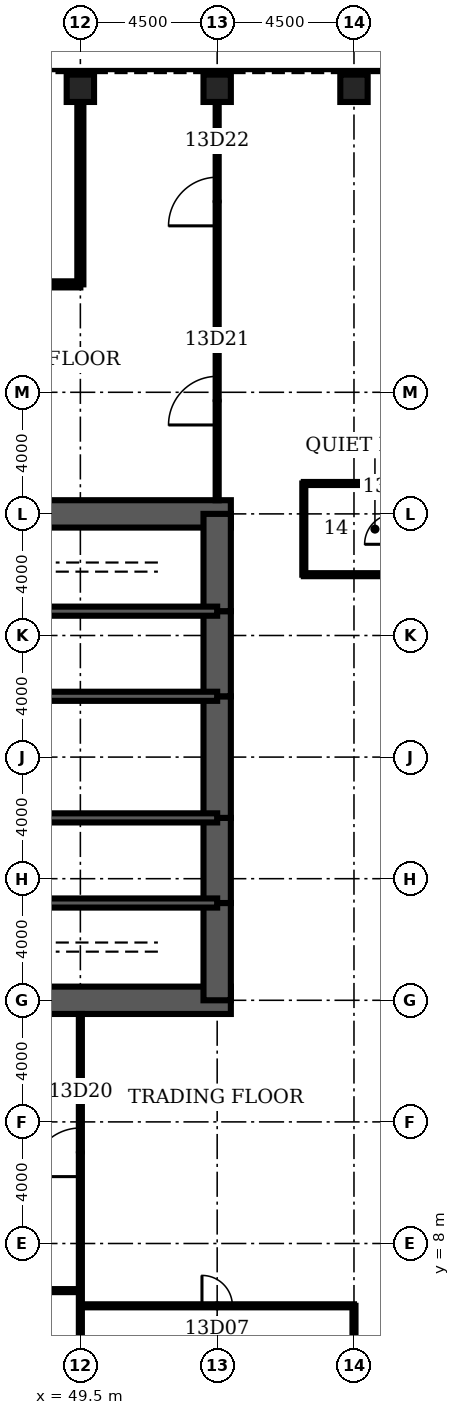
"""IFC4 building model, lengths in metres.
Left out: names, types, materials, properties, quantities, classifications, styles, units other than length and angle.
Written with IfcOpenShell. Run it as: python <this file> out.ifc"""

import sys

from ifc_helpers import new_model, si_unit, direction, frame, frame_2d, origin, origin_2d, place, context, subcontext, project, spatial, rectangle, hollow_rectangle, extrude, element, fill, save


model = new_model("IFC4")
c1 = context("Model", 3, precision=1e-05, world=origin(), true_north=direction((0.0, 1.0)))
c2 = subcontext(c1, "Body", "Model", "MODEL_VIEW")
j1 = project(units=[si_unit("LENGTHUNIT", "METRE"), si_unit("PLANEANGLEUNIT", "RADIAN")], contexts=[c1])
p1 = place(None, origin())
s1 = spatial("IfcSite", under=j1, at=p1, CompositionType="ELEMENT")
p2 = place(p1, origin())
s2 = spatial("IfcBuilding", under=s1, at=p2, CompositionType="ELEMENT")
p3 = place(p2, frame((0.0, 0.0, 63.5)))
s3 = spatial("IfcBuildingStorey", under=s2, at=p3, CompositionType="ELEMENT", Elevation=63.5)
for number, where, z_axis, x_axis in (
    (1, (58.5, 46.0, 0.0), (0.0, 0.0, 1.0), (0.0, 1.0, 0.0)),
    (2, (54.0, 46.0, 0.0), (0.0, 0.0, 1.0), (0.0, 1.0, 0.0)),
    (3, (49.5, 46.0, 0.0), (0.0, 0.0, 1.0), (0.0, 1.0, 0.0)),
):
    element("IfcColumn", number, at=place(p3, frame(where, z_axis=z_axis, x_axis=x_axis)), inside=s3, PredefinedType="COLUMN", context=c2, shape_type="SweptSolid", body=[
        extrude(hollow_rectangle(XDim=0.9, YDim=0.9, WallThickness=0.12, at=origin_2d()), origin(), (0.0, 0.0, 1.0), 4.5),
    ])
for number, where, z_axis, x_axis in (
    (4, (45.0, 16.0, 0.0), (0.0, 0.0, 1.0), (1.0, 0.0, 0.0)),
    (5, (54.45, 32.0, 0.0), (0.0, 0.0, 1.0), (-1.0, 0.0, 0.0)),
):
    element("IfcWall", number, at=place(p3, frame(where, z_axis=z_axis, x_axis=x_axis)), inside=s3, PredefinedType="SHEAR", context=c2, shape_type="SweptSolid", body=[
        extrude(rectangle(XDim=9.45, YDim=0.9, at=frame_2d((4.725, 0.0))), origin(), (0.0, 0.0, 1.0), 4.5),
    ])
p4 = place(p3, frame((54.0, 16.0, 0.0), z_axis=(0.0, 0.0, 1.0), x_axis=(0.0, 1.0, 0.0)))
e6 = element("IfcWall", 6, at=p4, inside=s3, PredefinedType="SHEAR", context=c2, shape_type="SweptSolid", body=[
    extrude(rectangle(XDim=3.2, YDim=0.9, at=frame_2d((1.6, 0.0))), origin(), (0.0, 0.0, 1.0), 4.5),
])
p5 = place(p3, frame((54.0, 19.2, 0.0), z_axis=(0.0, 0.0, 1.0), x_axis=(0.0, 1.0, 0.0)))
e7 = element("IfcWall", 7, at=p5, inside=s3, PredefinedType="SHEAR", context=c2, shape_type="SweptSolid", body=[
    extrude(rectangle(XDim=2.8, YDim=0.9, at=frame_2d((1.4, 0.0))), origin(), (0.0, 0.0, 1.0), 4.5),
])
p6 = place(p5, frame((0.4, 0.0, 0.0)))
e8 = element("IfcOpeningElement", 8, at=p6, cuts=e7, PredefinedType="OPENING", context=c2, shape_type="SweptSolid", body=[
    extrude(rectangle(XDim=1.8, YDim=2.1, at=frame_2d((0.9, 1.05))), frame((0.0, 0.46, 0.0), z_axis=(0.0, -1.0, 0.0), x_axis=(1.0, 0.0, 0.0)), (0.0, 0.0, 1.0), 0.92),
])
p7 = place(p3, frame((54.0, 22.0, 0.0), z_axis=(0.0, 0.0, 1.0), x_axis=(0.0, 1.0, 0.0)))
e9 = element("IfcWall", 9, at=p7, inside=s3, PredefinedType="SHEAR", context=c2, shape_type="SweptSolid", body=[
    extrude(rectangle(XDim=4.0, YDim=0.9, at=frame_2d((2.0, 0.0))), origin(), (0.0, 0.0, 1.0), 4.5),
])
p8 = place(p3, frame((54.0, 26.0, 0.0), z_axis=(0.0, 0.0, 1.0), x_axis=(0.0, 1.0, 0.0)))
e10 = element("IfcWall", 10, at=p8, inside=s3, PredefinedType="SHEAR", context=c2, shape_type="SweptSolid", body=[
    extrude(rectangle(XDim=2.8, YDim=0.9, at=frame_2d((1.4, 0.0))), origin(), (0.0, 0.0, 1.0), 4.5),
])
p9 = place(p8, frame((0.6, 0.0, 0.0)))
e11 = element("IfcOpeningElement", 11, at=p9, cuts=e10, PredefinedType="OPENING", context=c2, shape_type="SweptSolid", body=[
    extrude(rectangle(XDim=1.8, YDim=2.1, at=frame_2d((0.9, 1.05))), frame((0.0, 0.46, 0.0), z_axis=(0.0, -1.0, 0.0), x_axis=(1.0, 0.0, 0.0)), (0.0, 0.0, 1.0), 0.92),
])
p10 = place(p3, frame((54.0, 28.8, 0.0), z_axis=(0.0, 0.0, 1.0), x_axis=(0.0, 1.0, 0.0)))
e12 = element("IfcWall", 12, at=p10, inside=s3, PredefinedType="SHEAR", context=c2, shape_type="SweptSolid", body=[
    extrude(rectangle(XDim=3.2, YDim=0.9, at=frame_2d((1.6, 0.0))), origin(), (0.0, 0.0, 1.0), 4.5),
])
p11 = place(p3, frame((45.0, 19.2, 0.0), z_axis=(0.0, 0.0, 1.0), x_axis=(1.0, 0.0, 0.0)))
e13 = element("IfcWall", 13, at=p11, inside=s3, PredefinedType="SOLIDWALL", context=c2, shape_type="SweptSolid", body=[
    extrude(rectangle(XDim=9.0, YDim=0.3, at=frame_2d((4.5, 0.0))), origin(), (0.0, 0.0, 1.0), 4.5),
])
p12 = place(p11, frame((7.35, 0.0, 0.0)))
e14 = element("IfcOpeningElement", 14, at=p12, cuts=e13, PredefinedType="OPENING", context=c2, shape_type="SweptSolid", body=[
    extrude(rectangle(XDim=1.0, YDim=2.1, at=frame_2d((0.5, 1.05))), frame((0.0, 0.16, 0.0), z_axis=(0.0, -1.0, 0.0), x_axis=(1.0, 0.0, 0.0)), (0.0, 0.0, 1.0), 0.32),
])
p13 = place(p3, frame((45.0, 28.8, 0.0), z_axis=(0.0, 0.0, 1.0), x_axis=(1.0, 0.0, 0.0)))
e15 = element("IfcWall", 15, at=p13, inside=s3, PredefinedType="SOLIDWALL", context=c2, shape_type="SweptSolid", body=[
    extrude(rectangle(XDim=9.0, YDim=0.3, at=frame_2d((4.5, 0.0))), origin(), (0.0, 0.0, 1.0), 4.5),
])
p14 = place(p13, frame((7.35, 0.0, 0.0)))
e16 = element("IfcOpeningElement", 16, at=p14, cuts=e15, PredefinedType="OPENING", context=c2, shape_type="SweptSolid", body=[
    extrude(rectangle(XDim=1.0, YDim=2.1, at=frame_2d((0.5, 1.05))), frame((0.0, 0.16, 0.0), z_axis=(0.0, -1.0, 0.0), x_axis=(1.0, 0.0, 0.0)), (0.0, 0.0, 1.0), 0.32),
])
p15 = place(p3, frame((48.0, 22.0, 0.0), z_axis=(0.0, 0.0, 1.0), x_axis=(1.0, 0.0, 0.0)))
e17 = element("IfcWall", 17, at=p15, inside=s3, PredefinedType="SOLIDWALL", context=c2, shape_type="SweptSolid", body=[
    extrude(rectangle(XDim=6.0, YDim=0.3, at=frame_2d((3.0, 0.0))), origin(), (0.0, 0.0, 1.0), 4.5),
])
p16 = place(p15, frame((2.0, 0.0, 0.0)))
e18 = element("IfcOpeningElement", 18, at=p16, cuts=e17, PredefinedType="OPENING", context=c2, shape_type="SweptSolid", body=[
    extrude(rectangle(XDim=1.0, YDim=2.1, at=frame_2d((0.5, 1.05))), frame((0.0, 0.16, 0.0), z_axis=(0.0, -1.0, 0.0), x_axis=(1.0, 0.0, 0.0)), (0.0, 0.0, 1.0), 0.32),
])
p17 = place(p15, frame((4.0, 0.0, 0.0)))
e19 = element("IfcOpeningElement", 19, at=p17, cuts=e17, PredefinedType="OPENING", context=c2, shape_type="SweptSolid", body=[
    extrude(rectangle(XDim=1.0, YDim=2.1, at=frame_2d((0.5, 1.05))), frame((0.0, 0.16, 0.0), z_axis=(0.0, -1.0, 0.0), x_axis=(1.0, 0.0, 0.0)), (0.0, 0.0, 1.0), 0.32),
])
p18 = place(p3, frame((48.0, 26.0, 0.0), z_axis=(0.0, 0.0, 1.0), x_axis=(1.0, 0.0, 0.0)))
e20 = element("IfcWall", 20, at=p18, inside=s3, PredefinedType="SOLIDWALL", context=c2, shape_type="SweptSolid", body=[
    extrude(rectangle(XDim=6.0, YDim=0.3, at=frame_2d((3.0, 0.0))), origin(), (0.0, 0.0, 1.0), 4.5),
])
p19 = place(p3, frame((51.375, 22.15, 0.0), z_axis=(0.0, 0.0, 1.0), x_axis=(0.0, 1.0, 0.0)))
e21 = element("IfcWall", 21, at=p19, inside=s3, PredefinedType="PARTITIONING", context=c2, shape_type="SweptSolid", body=[
    extrude(rectangle(XDim=3.7, YDim=0.15, at=frame_2d((1.85, 0.0))), origin(), (0.0, 0.0, 1.0), 3.0),
])
p20 = place(p3, frame((49.5, 5.95, 0.0), z_axis=(0.0, 0.0, 1.0), x_axis=(1.0, 0.0, 0.0)))
e22 = element("IfcWall", 22, at=p20, inside=s3, PredefinedType="PARTITIONING", context=c2, shape_type="SweptSolid", body=[
    extrude(rectangle(XDim=9.0, YDim=0.1, at=frame_2d((4.5, 0.0))), origin(), (0.0, 0.0, 1.0), 3.0),
])
p21 = place(p20, frame((4.0, 0.0, 0.0)))
e23 = element("IfcOpeningElement", 23, at=p21, cuts=e22, PredefinedType="OPENING", context=c2, shape_type="SweptSolid", body=[
    extrude(rectangle(XDim=1.0, YDim=2.1, at=frame_2d((0.5, 1.05))), frame((0.0, 0.06, 0.0), z_axis=(0.0, -1.0, 0.0), x_axis=(1.0, 0.0, 0.0)), (0.0, 0.0, 1.0), 0.12),
])
p22 = place(p3, frame((36.0, 6.45, 0.0), z_axis=(0.0, 0.0, 1.0), x_axis=(1.0, 0.0, 0.0)))
e24 = element("IfcWall", 24, at=p22, inside=s3, PredefinedType="PARTITIONING", context=c2, shape_type="SweptSolid", body=[
    extrude(rectangle(XDim=13.5, YDim=0.1, at=frame_2d((6.75, 0.0))), origin(), (0.0, 0.0, 1.0), 3.0),
])
p23 = place(p22, frame((5.95, 0.0, 0.0)))
e25 = element("IfcOpeningElement", 25, at=p23, cuts=e24, PredefinedType="OPENING", context=c2, shape_type="SweptSolid", body=[
    extrude(rectangle(XDim=1.6, YDim=2.1, at=frame_2d((0.8, 1.05))), frame((0.0, 0.06, 0.0), z_axis=(0.0, -1.0, 0.0), x_axis=(1.0, 0.0, 0.0)), (0.0, 0.0, 1.0), 0.12),
])
for number, where, z_axis, x_axis in (
    (26, (56.85, 30.0, 0.0), (0.0, 0.0, 1.0), (1.0, 0.0, 0.0)),
    (27, (56.85, 33.0, 0.0), (0.0, 0.0, 1.0), (1.0, 0.0, 0.0)),
):
    element("IfcWall", number, at=place(p3, frame(where, z_axis=z_axis, x_axis=x_axis)), inside=s3, PredefinedType="PARTITIONING", context=c2, shape_type="SweptSolid", body=[
        extrude(rectangle(XDim=3.0, YDim=0.1, at=frame_2d((1.5, 0.0))), origin(), (0.0, 0.0, 1.0), 3.0),
    ])
p24 = place(p3, frame((40.5, 39.55, 0.0), z_axis=(0.0, 0.0, 1.0), x_axis=(1.0, 0.0, 0.0)))
e28 = element("IfcWall", 28, at=p24, inside=s3, PredefinedType="PARTITIONING", context=c2, shape_type="SweptSolid", body=[
    extrude(rectangle(XDim=9.0, YDim=0.2, at=frame_2d((4.5, 0.0))), origin(), (0.0, 0.0, 1.0), 3.0),
])
p25 = place(p24, frame((3.7, 0.0, 0.0)))
e29 = element("IfcOpeningElement", 29, at=p25, cuts=e28, PredefinedType="OPENING", context=c2, shape_type="SweptSolid", body=[
    extrude(rectangle(XDim=1.6, YDim=2.1, at=frame_2d((0.8, 1.05))), frame((0.0, 0.11, 0.0), z_axis=(0.0, -1.0, 0.0), x_axis=(1.0, 0.0, 0.0)), (0.0, 0.0, 1.0), 0.22),
])
p26 = place(p3, frame((49.5, 0.45, 0.0), z_axis=(0.0, 0.0, 1.0), x_axis=(0.0, 1.0, 0.0)))
e30 = element("IfcWall", 30, at=p26, inside=s3, PredefinedType="PARTITIONING", context=c2, shape_type="SweptSolid", body=[
    extrude(rectangle(XDim=15.1, YDim=0.1, at=frame_2d((7.55, 0.0))), origin(), (0.0, 0.0, 1.0), 3.0),
])
p27 = place(p26, frame((9.75, 0.0, 0.0)))
e31 = element("IfcOpeningElement", 31, at=p27, cuts=e30, PredefinedType="OPENING", context=c2, shape_type="SweptSolid", body=[
    extrude(rectangle(XDim=1.6, YDim=2.1, at=frame_2d((0.8, 1.05))), frame((0.0, 0.06, 0.0), z_axis=(0.0, -1.0, 0.0), x_axis=(1.0, 0.0, 0.0)), (0.0, 0.0, 1.0), 0.12),
])
p28 = place(p3, frame((49.5, 39.55, 0.0), z_axis=(0.0, 0.0, 1.0), x_axis=(0.0, 1.0, 0.0)))
e32 = element("IfcWall", 32, at=p28, inside=s3, PredefinedType="PARTITIONING", context=c2, shape_type="SweptSolid", body=[
    extrude(rectangle(XDim=6.0, YDim=0.2, at=frame_2d((3.0, 0.0))), origin(), (0.0, 0.0, 1.0), 3.0),
])
p29 = place(p3, frame((54.0, 32.45, 0.0), z_axis=(0.0, 0.0, 1.0), x_axis=(0.0, 1.0, 0.0)))
e33 = element("IfcWall", 33, at=p29, inside=s3, PredefinedType="PARTITIONING", context=c2, shape_type="SweptSolid", body=[
    extrude(rectangle(XDim=13.1, YDim=0.1, at=frame_2d((6.55, 0.0))), origin(), (0.0, 0.0, 1.0), 3.0),
])
p30 = place(p29, frame((2.475, 0.0, 0.0)))
e34 = element("IfcOpeningElement", 34, at=p30, cuts=e33, PredefinedType="OPENING", context=c2, shape_type="SweptSolid", body=[
    extrude(rectangle(XDim=1.6, YDim=2.1, at=frame_2d((0.8, 1.05))), frame((0.0, 0.06, 0.0), z_axis=(0.0, -1.0, 0.0), x_axis=(1.0, 0.0, 0.0)), (0.0, 0.0, 1.0), 0.12),
])
p31 = place(p29, frame((9.025, 0.0, 0.0)))
e35 = element("IfcOpeningElement", 35, at=p31, cuts=e33, PredefinedType="OPENING", context=c2, shape_type="SweptSolid", body=[
    extrude(rectangle(XDim=1.6, YDim=2.1, at=frame_2d((0.8, 1.05))), frame((0.0, 0.06, 0.0), z_axis=(0.0, -1.0, 0.0), x_axis=(1.0, 0.0, 0.0)), (0.0, 0.0, 1.0), 0.12),
])
p32 = place(p3, frame((56.85, 30.0, 0.0), z_axis=(0.0, 0.0, 1.0), x_axis=(0.0, 1.0, 0.0)))
e36 = element("IfcWall", 36, at=p32, inside=s3, PredefinedType="PARTITIONING", context=c2, shape_type="SweptSolid", body=[
    extrude(rectangle(XDim=3.0, YDim=0.1, at=frame_2d((1.5, 0.0))), origin(), (0.0, 0.0, 1.0), 3.0),
])
p33 = place(p3, frame((58.5, 0.45, 0.0), z_axis=(0.0, 0.0, 1.0), x_axis=(0.0, 1.0, 0.0)))
e37 = element("IfcWall", 37, at=p33, inside=s3, PredefinedType="PARTITIONING", context=c2, shape_type="SweptSolid", body=[
    extrude(rectangle(XDim=5.5, YDim=0.1, at=frame_2d((2.75, 0.0))), origin(), (0.0, 0.0, 1.0), 3.0),
])
p34 = place(p21, origin())
e38 = element("IfcDoor", 38, at=p34, inside=s3, OperationType="SINGLE_SWING_LEFT", PredefinedType="DOOR", context=c2, shape_type="SweptSolid", body=[
    extrude(rectangle(XDim=1.0, YDim=2.1, at=frame_2d((0.5, 1.05))), frame((0.0, 0.025, 0.0), z_axis=(0.0, -1.0, 0.0), x_axis=(1.0, 0.0, 0.0)), (0.0, 0.0, 1.0), 0.05),
])
fill(e23, e38)
p35 = place(p27, origin())
e39 = element("IfcDoor", 39, at=p35, inside=s3, OperationType="SINGLE_SWING_LEFT", PredefinedType="DOOR", context=c2, shape_type="SweptSolid", body=[
    extrude(rectangle(XDim=1.6, YDim=2.1, at=frame_2d((0.8, 1.05))), frame((0.0, 0.025, 0.0), z_axis=(0.0, -1.0, 0.0), x_axis=(1.0, 0.0, 0.0)), (0.0, 0.0, 1.0), 0.05),
])
fill(e31, e39)
p36 = place(p30, origin())
e40 = element("IfcDoor", 40, at=p36, inside=s3, OperationType="SINGLE_SWING_LEFT", PredefinedType="DOOR", context=c2, shape_type="SweptSolid", body=[
    extrude(rectangle(XDim=1.6, YDim=2.1, at=frame_2d((0.8, 1.05))), frame((0.0, 0.025, 0.0), z_axis=(0.0, -1.0, 0.0), x_axis=(1.0, 0.0, 0.0)), (0.0, 0.0, 1.0), 0.05),
])
fill(e34, e40)
p37 = place(p31, origin())
e41 = element("IfcDoor", 41, at=p37, inside=s3, OperationType="SINGLE_SWING_LEFT", PredefinedType="DOOR", context=c2, shape_type="SweptSolid", body=[
    extrude(rectangle(XDim=1.6, YDim=2.1, at=frame_2d((0.8, 1.05))), frame((0.0, 0.025, 0.0), z_axis=(0.0, -1.0, 0.0), x_axis=(1.0, 0.0, 0.0)), (0.0, 0.0, 1.0), 0.05),
])
fill(e35, e41)
p38 = place(p12, origin())
e42 = element("IfcDoor", 42, at=p38, inside=s3, OperationType="SINGLE_SWING_RIGHT", PredefinedType="DOOR", context=c2, shape_type="SweptSolid", body=[
    extrude(rectangle(XDim=1.0, YDim=2.1, at=frame_2d((0.5, 1.05))), frame((0.0, 0.025, 0.0), z_axis=(0.0, -1.0, 0.0), x_axis=(1.0, 0.0, 0.0)), (0.0, 0.0, 1.0), 0.05),
])
fill(e14, e42)
p39 = place(p14, origin())
e43 = element("IfcDoor", 43, at=p39, inside=s3, OperationType="SINGLE_SWING_RIGHT", PredefinedType="DOOR", context=c2, shape_type="SweptSolid", body=[
    extrude(rectangle(XDim=1.0, YDim=2.1, at=frame_2d((0.5, 1.05))), frame((0.0, 0.025, 0.0), z_axis=(0.0, -1.0, 0.0), x_axis=(1.0, 0.0, 0.0)), (0.0, 0.0, 1.0), 0.05),
])
fill(e16, e43)
p40 = place(p6, origin())
e44 = element("IfcDoor", 44, at=p40, inside=s3, OperationType="SINGLE_SWING_LEFT", PredefinedType="DOOR", context=c2, shape_type="SweptSolid", body=[
    extrude(rectangle(XDim=1.8, YDim=2.1, at=frame_2d((0.9, 1.05))), frame((0.0, 0.45, 0.0), z_axis=(0.0, -1.0, 0.0), x_axis=(1.0, 0.0, 0.0)), (0.0, 0.0, 1.0), 0.899),
])
fill(e8, e44)
p41 = place(p9, origin())
e45 = element("IfcDoor", 45, at=p41, inside=s3, OperationType="SINGLE_SWING_LEFT", PredefinedType="DOOR", context=c2, shape_type="SweptSolid", body=[
    extrude(rectangle(XDim=1.8, YDim=2.1, at=frame_2d((0.9, 1.05))), frame((0.0, 0.45, 0.0), z_axis=(0.0, -1.0, 0.0), x_axis=(1.0, 0.0, 0.0)), (0.0, 0.0, 1.0), 0.899),
])
fill(e11, e45)
p42 = place(p16, origin())
e46 = element("IfcDoor", 46, at=p42, inside=s3, OperationType="SINGLE_SWING_LEFT", PredefinedType="DOOR", context=c2, shape_type="SweptSolid", body=[
    extrude(rectangle(XDim=1.0, YDim=2.1, at=frame_2d((0.5, 1.05))), frame((0.0, 0.025, 0.0), z_axis=(0.0, -1.0, 0.0), x_axis=(1.0, 0.0, 0.0)), (0.0, 0.0, 1.0), 0.05),
])
fill(e18, e46)
p43 = place(p17, origin())
e47 = element("IfcDoor", 47, at=p43, inside=s3, OperationType="SINGLE_SWING_RIGHT", PredefinedType="DOOR", context=c2, shape_type="SweptSolid", body=[
    extrude(rectangle(XDim=1.0, YDim=2.1, at=frame_2d((0.5, 1.05))), frame((0.0, 0.025, 0.0), z_axis=(0.0, -1.0, 0.0), x_axis=(1.0, 0.0, 0.0)), (0.0, 0.0, 1.0), 0.05),
])
fill(e19, e47)
save(model, sys.argv[1])
